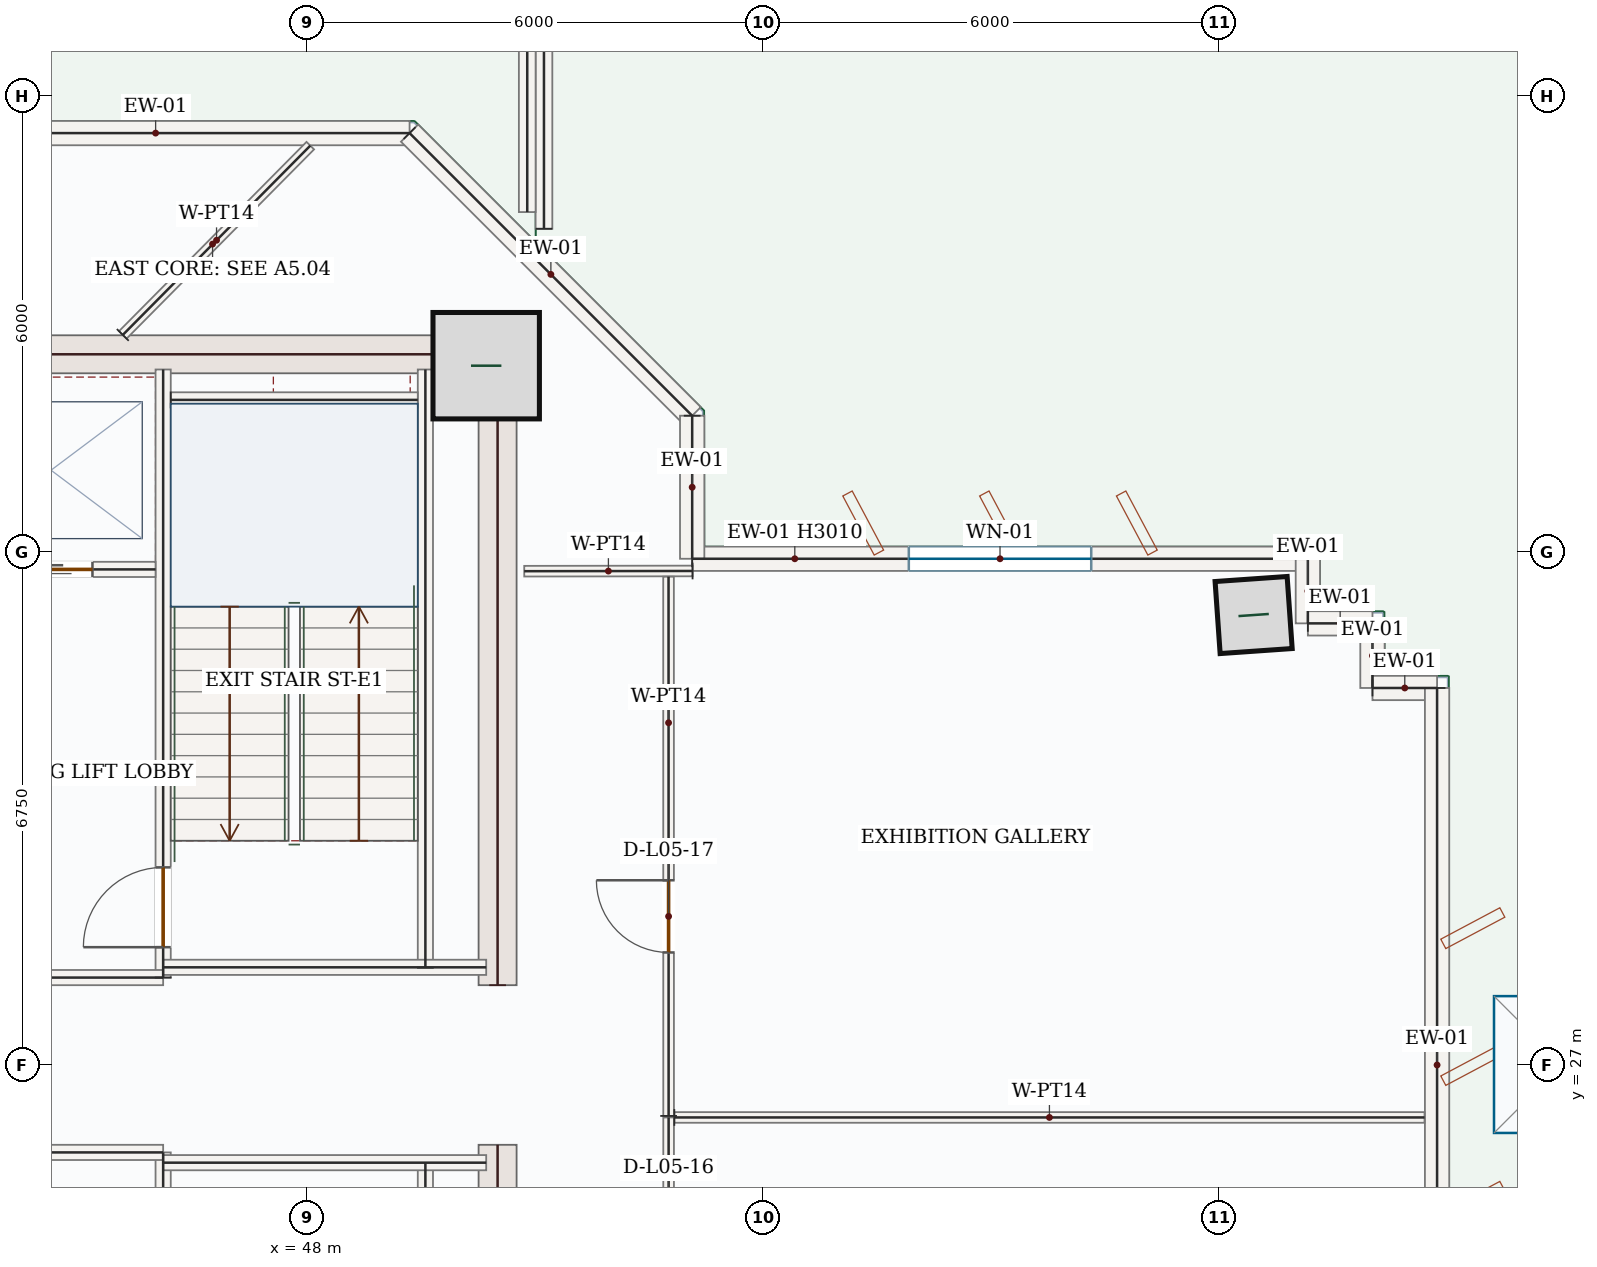
"""IFC4 building model, lengths in metres.
Left out: names, types, materials, properties, quantities, classifications, styles, units other than length and angle.
Written with IfcOpenShell. Run it as: python <this file> out.ifc"""

import sys

from ifc_helpers import new_model, si_unit, direction, frame, frame_2d, origin, origin_2d, place, context, subcontext, project, spatial, rectangle, hollow_rectangle, extrude, source, transform, mapped, element, fill, save


model = new_model("IFC4")
c1 = context("Model", 3, precision=1e-05, world=origin(), true_north=direction((0.0, 1.0)))
c2 = subcontext(c1, "Body", "Model", "MODEL_VIEW")
j1 = project(units=[si_unit("LENGTHUNIT", "METRE"), si_unit("PLANEANGLEUNIT", "RADIAN")], contexts=[c1])
p1 = place(None, origin())
s1 = spatial("IfcSite", under=j1, at=p1, CompositionType="ELEMENT")
p2 = place(p1, origin())
s2 = spatial("IfcBuilding", under=s1, at=p2, CompositionType="ELEMENT")
p3 = place(p2, frame((0.0, 0.0, 29.1)))
s3 = spatial("IfcBuildingStorey", under=s2, at=p3, CompositionType="ELEMENT", Elevation=29.1)
m1 = source(origin(), c2, "Body", "SweptSolid", [
    extrude(rectangle(XDim=8.55, YDim=0.5, at=frame_2d((4.275, 0.0))), origin(), (0.0, 0.0, 1.0), 3.95),
])
for number, where, z_axis, x_axis in (
    (1, (50.5, 17.4, 0.0), (0.0, 0.0, 1.0), (0.0, 1.0, 0.0)),
    (2, (50.5, 28.05, 0.0), (0.0, 0.0, 1.0), (0.0, 1.0, 0.0)),
):
    element("IfcWall", number, at=place(p3, frame(where, z_axis=z_axis, x_axis=x_axis)), inside=s3, PredefinedType="SHEAR", context=c2, shape_type="MappedRepresentation", body=[
        mapped(m1, transform((0.0, 0.0, 0.0), x_axis=(1.0, 0.0, 0.0), y_axis=(0.0, 1.0, 0.0), z_axis=(0.0, 0.0, 1.0), scale=1.0)),
    ])
m2 = source(origin(), c2, "Body", "SweptSolid", [
    extrude(rectangle(XDim=7.0, YDim=0.5, at=frame_2d((3.5, 0.0))), origin(), (0.0, 0.0, 1.0), 3.95),
])
p4 = place(p3, frame((43.25, 36.35, 0.0), z_axis=(0.0, 0.0, 1.0), x_axis=(1.0, 0.0, 0.0)))
e3 = element("IfcWall", 3, at=p4, inside=s3, PredefinedType="SHEAR", context=c2, shape_type="MappedRepresentation", body=[
    mapped(m2, transform((0.0, 0.0, 0.0), x_axis=(1.0, 0.0, 0.0), y_axis=(0.0, 1.0, 0.0), z_axis=(0.0, 0.0, 1.0), scale=1.0)),
])
m3 = source(origin(), c2, "Body", "SweptSolid", [
    extrude(rectangle(XDim=1.4, YDim=1.4, at=origin_2d()), origin(), (0.0, 0.0, 1.0), 4.2),
])
p5 = place(p3, frame((50.35, 36.2, 0.0), z_axis=(0.0, 0.0, 1.0), x_axis=(1.0, 0.0, 0.0)))
e4 = element("IfcColumn", 4, at=p5, inside=s3, PredefinedType="COLUMN", context=c2, shape_type="MappedRepresentation", body=[
    mapped(m3, transform((0.0, 0.0, 0.0), x_axis=(1.0, 0.0, 0.0), y_axis=(0.0, 1.0, 0.0), z_axis=(0.0, 0.0, 1.0), scale=1.0)),
])
m4 = source(origin(), c2, "Body", "SweptSolid", [
    extrude(hollow_rectangle(XDim=0.95, YDim=0.95, WallThickness=0.05, at=origin_2d()), origin(), (0.0, 0.0, 1.0), 4.2),
])
p6 = place(p3, frame((60.447, 32.92, 0.0), z_axis=(0.0, 0.0, 1.0), x_axis=(0.99756405026, 0.069756473744, 0.0)))
e5 = element("IfcColumn", 5, at=p6, inside=s3, PredefinedType="COLUMN", context=c2, shape_type="MappedRepresentation", body=[
    mapped(m4, transform((0.0, 0.0, 0.0), x_axis=(1.0, 0.0, 0.0), y_axis=(0.0, 1.0, 0.0), z_axis=(0.0, 0.0, 1.0), scale=1.0)),
])
m5 = source(origin(), c2, "Body", "SweptSolid", [
    extrude(rectangle(XDim=10.889, YDim=0.22, at=frame_2d((5.444, 0.0))), origin(), (0.0, 0.0, 1.0), 1.2),
])
p7 = place(p3, frame((51.11, 38.001, 0.0), z_axis=(0.0, 0.0, 1.0), x_axis=(0.0, 1.0, 0.0)))
e6 = element("IfcWall", 6, at=p7, inside=s3, PredefinedType="PARAPET", context=c2, shape_type="MappedRepresentation", body=[
    mapped(m5, transform((0.0, 0.0, 0.0), x_axis=(1.0, 0.0, 0.0), y_axis=(0.0, 1.0, 0.0), z_axis=(0.0, 0.0, 1.0), scale=1.0)),
])
m6 = source(origin(), c2, "Body", "SweptSolid", [
    extrude(rectangle(XDim=10.669, YDim=0.22, at=frame_2d((5.334, 0.0))), origin(), (0.0, 0.0, 1.0), 1.2),
])
p8 = place(p3, frame((50.89, 48.89, 0.0), z_axis=(0.0, 0.0, 1.0), x_axis=(0.0, -1.0, 0.0)))
e7 = element("IfcWall", 7, at=p8, inside=s3, PredefinedType="PARAPET", context=c2, shape_type="MappedRepresentation", body=[
    mapped(m6, transform((0.0, 0.0, 0.0), x_axis=(1.0, 0.0, 0.0), y_axis=(0.0, 1.0, 0.0), z_axis=(0.0, 0.0, 1.0), scale=1.0)),
])
p9 = place(p3, frame((53.06, 33.66, 0.0), z_axis=(0.0, 0.0, 1.0), x_axis=(1.0, 0.0, 0.0)))
e8 = element("IfcWall", 8, at=p9, inside=s3, PredefinedType="SOLIDWALL", context=c2, shape_type="SweptSolid", body=[
    extrude(rectangle(XDim=8.1, YDim=0.32, at=frame_2d((4.05, 0.0))), origin(), (0.0, 0.0, 1.0), 3.01),
])
p10 = place(p9, frame((2.85, 0.0, 0.85)))
e9 = element("IfcOpeningElement", 9, at=p10, cuts=e8, PredefinedType="OPENING", context=c2, shape_type="SweptSolid", body=[
    extrude(rectangle(XDim=2.4, YDim=1.8, at=frame_2d((1.2, 0.9))), frame((0.0, 0.17, 0.0), z_axis=(0.0, -1.0, 0.0), x_axis=(1.0, 0.0, 0.0)), (0.0, 0.0, 1.0), 0.34),
])
m7 = source(origin(), c2, "Body", "SweptSolid", [
    extrude(rectangle(XDim=0.85, YDim=0.32, at=frame_2d((0.425, 0.0))), origin(), (0.0, 0.0, 1.0), 3.95),
])
p11 = place(p3, frame((61.16, 33.66, 0.0), z_axis=(0.0, 0.0, 1.0), x_axis=(0.0, -1.0, 0.0)))
e10 = element("IfcWall", 10, at=p11, inside=s3, PredefinedType="SOLIDWALL", context=c2, shape_type="MappedRepresentation", body=[
    mapped(m7, transform((0.0, 0.0, 0.0), x_axis=(1.0, 0.0, 0.0), y_axis=(0.0, 1.0, 0.0), z_axis=(0.0, 0.0, 1.0), scale=1.0)),
])
m8 = source(origin(), c2, "Body", "SweptSolid", [
    extrude(rectangle(XDim=0.85, YDim=0.32, at=frame_2d((0.425, 0.0))), origin(), (0.0, 0.0, 1.0), 3.95),
])
for number, where, z_axis, x_axis in (
    (11, (61.16, 32.81, 0.0), (0.0, 0.0, 1.0), (1.0, 0.0, 0.0)),
    (12, (62.01, 32.81, 0.0), (0.0, 0.0, 1.0), (0.0, -1.0, 0.0)),
    (13, (62.01, 31.96, 0.0), (0.0, 0.0, 1.0), (1.0, 0.0, 0.0)),
):
    element("IfcWall", number, at=place(p3, frame(where, z_axis=z_axis, x_axis=x_axis)), inside=s3, PredefinedType="SOLIDWALL", context=c2, shape_type="MappedRepresentation", body=[
        mapped(m8, transform((0.0, 0.0, 0.0), x_axis=(1.0, 0.0, 0.0), y_axis=(0.0, 1.0, 0.0), z_axis=(0.0, 0.0, 1.0), scale=1.0)),
    ])
m9 = source(origin(), c2, "Body", "SweptSolid", [
    extrude(rectangle(XDim=9.92, YDim=0.32, at=frame_2d((4.96, 0.0))), origin(), (0.0, 0.0, 1.0), 3.95),
])
p12 = place(p3, frame((62.86, 31.96, 0.0), z_axis=(0.0, 0.0, 1.0), x_axis=(0.0, -1.0, 0.0)))
e14 = element("IfcWall", 14, at=p12, inside=s3, PredefinedType="SOLIDWALL", context=c2, shape_type="MappedRepresentation", body=[
    mapped(m9, transform((0.0, 0.0, 0.0), x_axis=(1.0, 0.0, 0.0), y_axis=(0.0, 1.0, 0.0), z_axis=(0.0, 0.0, 1.0), scale=1.0)),
])
m10 = source(origin(), c2, "Body", "SweptSolid", [
    extrude(rectangle(XDim=6.682, YDim=0.32, at=frame_2d((3.341, 0.0))), origin(), (0.0, 0.0, 1.0), 3.95),
])
p13 = place(p3, frame((42.66, 39.26, 0.0), z_axis=(0.0, 0.0, 1.0), x_axis=(1.0, 0.0, 0.0)))
e15 = element("IfcWall", 15, at=p13, inside=s3, PredefinedType="SOLIDWALL", context=c2, shape_type="MappedRepresentation", body=[
    mapped(m10, transform((0.0, 0.0, 0.0), x_axis=(1.0, 0.0, 0.0), y_axis=(0.0, 1.0, 0.0), z_axis=(0.0, 0.0, 1.0), scale=1.0)),
])
m11 = source(origin(), c2, "Body", "SweptSolid", [
    extrude(rectangle(XDim=5.258, YDim=0.32, at=frame_2d((2.629, 0.0))), origin(), (0.0, 0.0, 1.0), 3.95),
])
p14 = place(p3, frame((49.342, 39.26, 0.0), z_axis=(0.0, 0.0, 1.0), x_axis=(0.707106781187, -0.707106781187, 0.0)))
e16 = element("IfcWall", 16, at=p14, inside=s3, PredefinedType="SOLIDWALL", context=c2, shape_type="MappedRepresentation", body=[
    mapped(m11, transform((0.0, 0.0, 0.0), x_axis=(1.0, 0.0, 0.0), y_axis=(0.0, 1.0, 0.0), z_axis=(0.0, 0.0, 1.0), scale=1.0)),
])
m12 = source(origin(), c2, "Body", "SweptSolid", [
    extrude(rectangle(XDim=1.882, YDim=0.32, at=frame_2d((0.941, 0.0))), origin(), (0.0, 0.0, 1.0), 3.95),
])
p15 = place(p3, frame((53.06, 35.542, 0.0), z_axis=(0.0, 0.0, 1.0), x_axis=(0.0, -1.0, 0.0)))
e17 = element("IfcWall", 17, at=p15, inside=s3, PredefinedType="SOLIDWALL", context=c2, shape_type="MappedRepresentation", body=[
    mapped(m12, transform((0.0, 0.0, 0.0), x_axis=(1.0, 0.0, 0.0), y_axis=(0.0, 1.0, 0.0), z_axis=(0.0, 0.0, 1.0), scale=1.0)),
])
m13 = source(origin(), c2, "Body", "SweptSolid", [
    extrude(rectangle(XDim=7.87, YDim=0.2, at=frame_2d((3.935, 0.0))), origin(), (0.0, 0.0, 1.0), 3.95),
])
for number, where, z_axis, x_axis in (
    (18, (49.55, 17.85, 0.0), (0.0, 0.0, 1.0), (0.0, 1.0, 0.0)),
    (19, (49.55, 28.28, 0.0), (0.0, 0.0, 1.0), (0.0, 1.0, 0.0)),
):
    element("IfcWall", number, at=place(p3, frame(where, z_axis=z_axis, x_axis=x_axis)), inside=s3, PredefinedType="SOLIDWALL", context=c2, shape_type="MappedRepresentation", body=[
        mapped(m13, transform((0.0, 0.0, 0.0), x_axis=(1.0, 0.0, 0.0), y_axis=(0.0, 1.0, 0.0), z_axis=(0.0, 0.0, 1.0), scale=1.0)),
    ])
p16 = place(p3, frame((46.1, 17.85, 0.0), z_axis=(0.0, 0.0, 1.0), x_axis=(0.0, 1.0, 0.0)))
e20 = element("IfcWall", 20, at=p16, inside=s3, PredefinedType="SOLIDWALL", context=c2, shape_type="SweptSolid", body=[
    extrude(rectangle(XDim=8.0, YDim=0.2, at=frame_2d((4.0, 0.0))), origin(), (0.0, 0.0, 1.0), 3.95),
])
p17 = place(p16, frame((6.3, 0.0, 0.0)))
e21 = element("IfcOpeningElement", 21, at=p17, cuts=e20, PredefinedType="OPENING", context=c2, shape_type="SweptSolid", body=[
    extrude(rectangle(XDim=1.05, YDim=2.15, at=frame_2d((0.525, 1.075))), frame((0.0, 0.11, 0.0), z_axis=(0.0, -1.0, 0.0), x_axis=(1.0, 0.0, 0.0)), (0.0, 0.0, 1.0), 0.22),
])
p18 = place(p3, frame((46.1, 28.15, 0.0), z_axis=(0.0, 0.0, 1.0), x_axis=(0.0, 1.0, 0.0)))
e22 = element("IfcWall", 22, at=p18, inside=s3, PredefinedType="SOLIDWALL", context=c2, shape_type="SweptSolid", body=[
    extrude(rectangle(XDim=8.0, YDim=0.2, at=frame_2d((4.0, 0.0))), origin(), (0.0, 0.0, 1.0), 3.95),
])
p19 = place(p18, frame((0.4, 0.0, 0.0)))
e23 = element("IfcOpeningElement", 23, at=p19, cuts=e22, PredefinedType="OPENING", context=c2, shape_type="SweptSolid", body=[
    extrude(rectangle(XDim=1.05, YDim=2.15, at=frame_2d((0.525, 1.075))), frame((0.0, 0.11, 0.0), z_axis=(0.0, -1.0, 0.0), x_axis=(1.0, 0.0, 0.0)), (0.0, 0.0, 1.0), 0.22),
])
m14 = source(origin(), c2, "Body", "SweptSolid", [
    extrude(rectangle(XDim=3.0, YDim=0.2, at=frame_2d((1.5, 0.0))), origin(), (0.0, 0.0, 1.0), 3.95),
])
p20 = place(p3, frame((43.1, 25.85, 0.0), z_axis=(0.0, 0.0, 1.0), x_axis=(1.0, 0.0, 0.0)))
e24 = element("IfcWall", 24, at=p20, inside=s3, PredefinedType="SOLIDWALL", context=c2, shape_type="MappedRepresentation", body=[
    mapped(m14, transform((0.0, 0.0, 0.0), x_axis=(1.0, 0.0, 0.0), y_axis=(0.0, 1.0, 0.0), z_axis=(0.0, 0.0, 1.0), scale=1.0)),
])
m15 = source(origin(), c2, "Body", "SweptSolid", [
    extrude(rectangle(XDim=4.25, YDim=0.2, at=frame_2d((2.125, 0.0))), origin(), (0.0, 0.0, 1.0), 3.95),
])
p21 = place(p3, frame((46.1, 25.715, 0.0), z_axis=(0.0, 0.0, 1.0), x_axis=(1.0, 0.0, 0.0)))
e25 = element("IfcWall", 25, at=p21, inside=s3, PredefinedType="SOLIDWALL", context=c2, shape_type="MappedRepresentation", body=[
    mapped(m15, transform((0.0, 0.0, 0.0), x_axis=(1.0, 0.0, 0.0), y_axis=(0.0, 1.0, 0.0), z_axis=(0.0, 0.0, 1.0), scale=1.0)),
])
p22 = place(p3, frame((43.1, 28.15, 0.0), z_axis=(0.0, 0.0, 1.0), x_axis=(1.0, 0.0, 0.0)))
e26 = element("IfcWall", 26, at=p22, inside=s3, PredefinedType="SOLIDWALL", context=c2, shape_type="MappedRepresentation", body=[
    mapped(m14, transform((0.0, 0.0, 0.0), x_axis=(1.0, 0.0, 0.0), y_axis=(0.0, 1.0, 0.0), z_axis=(0.0, 0.0, 1.0), scale=1.0)),
])
p23 = place(p3, frame((46.1, 28.285, 0.0), z_axis=(0.0, 0.0, 1.0), x_axis=(1.0, 0.0, 0.0)))
e27 = element("IfcWall", 27, at=p23, inside=s3, PredefinedType="SOLIDWALL", context=c2, shape_type="MappedRepresentation", body=[
    mapped(m15, transform((0.0, 0.0, 0.0), x_axis=(1.0, 0.0, 0.0), y_axis=(0.0, 1.0, 0.0), z_axis=(0.0, 0.0, 1.0), scale=1.0)),
])
m16 = source(origin(), c2, "Body", "SweptSolid", [
    extrude(rectangle(XDim=3.25, YDim=0.2, at=frame_2d((1.625, 0.0))), origin(), (0.0, 0.0, 1.0), 3.95),
])
p24 = place(p3, frame((46.2, 35.75, 0.0), z_axis=(0.0, 0.0, 1.0), x_axis=(1.0, 0.0, 0.0)))
e28 = element("IfcWall", 28, at=p24, inside=s3, PredefinedType="SOLIDWALL", context=c2, shape_type="MappedRepresentation", body=[
    mapped(m16, transform((0.0, 0.0, 0.0), x_axis=(1.0, 0.0, 0.0), y_axis=(0.0, 1.0, 0.0), z_axis=(0.0, 0.0, 1.0), scale=1.0)),
])
p25 = place(p3, frame((43.25, 33.52, 0.0), z_axis=(0.0, 0.0, 1.0), x_axis=(1.0, 0.0, 0.0)))
e29 = element("IfcWall", 29, at=p25, inside=s3, PredefinedType="SOLIDWALL", context=c2, shape_type="SweptSolid", body=[
    extrude(rectangle(XDim=2.75, YDim=0.2, at=frame_2d((1.375, 0.0))), origin(), (0.0, 0.0, 1.0), 3.95),
])
p26 = place(p25, frame((0.82, 0.0, 0.0)))
e30 = element("IfcOpeningElement", 30, at=p26, cuts=e29, PredefinedType="OPENING", context=c2, shape_type="SweptSolid", body=[
    extrude(rectangle(XDim=1.1, YDim=2.15, at=frame_2d((0.55, 1.075))), frame((0.0, 0.11, 0.0), z_axis=(0.0, -1.0, 0.0), x_axis=(1.0, 0.0, 0.0)), (0.0, 0.0, 1.0), 0.22),
])
p27 = place(p3, frame((52.75, 20.575, 0.0), z_axis=(0.0, 0.0, 1.0), x_axis=(0.0, 1.0, 0.0)))
e31 = element("IfcWall", 31, at=p27, inside=s3, PredefinedType="PARTITIONING", context=c2, shape_type="SweptSolid", body=[
    extrude(rectangle(XDim=5.735, YDim=0.14, at=frame_2d((2.868, 0.0))), origin(), (0.0, 0.0, 1.0), 3.95),
])
p28 = place(p27, frame((3.732, 0.0, 0.0)))
e32 = element("IfcOpeningElement", 32, at=p28, cuts=e31, PredefinedType="OPENING", context=c2, shape_type="SweptSolid", body=[
    extrude(rectangle(XDim=0.95, YDim=2.15, at=frame_2d((0.475, 1.075))), frame((0.0, 0.08, 0.0), z_axis=(0.0, -1.0, 0.0), x_axis=(1.0, 0.0, 0.0)), (0.0, 0.0, 1.0), 0.16),
])
m17 = source(origin(), c2, "Body", "SweptSolid", [
    extrude(rectangle(XDim=9.87, YDim=0.14, at=frame_2d((4.935, 0.0))), origin(), (0.0, 0.0, 1.0), 3.95),
])
p29 = place(p3, frame((52.825, 26.31, 0.0), z_axis=(0.0, 0.0, 1.0), x_axis=(1.0, 0.0, 0.0)))
e33 = element("IfcWall", 33, at=p29, inside=s3, PredefinedType="PARTITIONING", context=c2, shape_type="MappedRepresentation", body=[
    mapped(m17, transform((0.0, 0.0, 0.0), x_axis=(1.0, 0.0, 0.0), y_axis=(0.0, 1.0, 0.0), z_axis=(0.0, 0.0, 1.0), scale=1.0)),
])
m18 = source(origin(), c2, "Body", "SweptSolid", [
    extrude(rectangle(XDim=2.214, YDim=0.14, at=frame_2d((1.107, 0.0))), origin(), (0.0, 0.0, 1.0), 3.95),
])
p30 = place(p3, frame((53.065, 33.5, 0.0), z_axis=(0.0, 0.0, 1.0), x_axis=(-0.99999912478, -0.001323041841, 0.0)))
e34 = element("IfcWall", 34, at=p30, inside=s3, PredefinedType="PARTITIONING", context=c2, shape_type="MappedRepresentation", body=[
    mapped(m18, transform((0.0, 0.0, 0.0), x_axis=(1.0, 0.0, 0.0), y_axis=(0.0, 1.0, 0.0), z_axis=(0.0, 0.0, 1.0), scale=1.0)),
])
m19 = source(origin(), c2, "Body", "SweptSolid", [
    extrude(rectangle(XDim=3.505, YDim=0.14, at=frame_2d((1.752, 0.0))), origin(), (0.0, 0.0, 1.0), 3.95),
])
p31 = place(p3, frame((45.569, 36.605, 0.0), z_axis=(0.0, 0.0, 1.0), x_axis=(0.703790445361, 0.710407635811, 0.0)))
e35 = element("IfcWall", 35, at=p31, inside=s3, PredefinedType="PARTITIONING", context=c2, shape_type="MappedRepresentation", body=[
    mapped(m19, transform((0.0, 0.0, 0.0), x_axis=(1.0, 0.0, 0.0), y_axis=(0.0, 1.0, 0.0), z_axis=(0.0, 0.0, 1.0), scale=1.0)),
])
p32 = place(p3, frame((52.75, 26.33, 0.0), z_axis=(0.0, 0.0, 1.0), x_axis=(-0.000137660459, 0.999999990525, 0.0)))
e36 = element("IfcWall", 36, at=p32, inside=s3, PredefinedType="PARTITIONING", context=c2, shape_type="SweptSolid", body=[
    extrude(rectangle(XDim=7.094, YDim=0.14, at=frame_2d((3.547, 0.0))), origin(), (0.0, 0.0, 1.0), 3.95),
])
p33 = place(p32, frame((2.15, 0.0, 0.0)))
e37 = element("IfcOpeningElement", 37, at=p33, cuts=e36, PredefinedType="OPENING", context=c2, shape_type="SweptSolid", body=[
    extrude(rectangle(XDim=0.95, YDim=2.15, at=frame_2d((0.475, 1.075))), frame((0.0, 0.08, 0.0), z_axis=(0.0, -1.0, 0.0), x_axis=(1.0, 0.0, 0.0)), (0.0, 0.0, 1.0), 0.16),
])
p34 = place(p3, frame((0.0, 0.0, -0.22)))
p35 = place(p34, frame((64.509, 27.006, 0.0)))
p36 = place(p35, frame((0.0, 0.0, 0.22)))
e38 = element("IfcWindow", 38, at=p36, inside=s3, PartitioningType="SINGLE_PANEL", PredefinedType="SKYLIGHT", context=c2, shape_type="SweptSolid", body=[
    extrude(rectangle(XDim=1.8, YDim=1.8, at=origin_2d()), origin(), (0.0, 0.0, 1.0), 0.05),
])
m20 = source(origin(), c2, "Body", "SweptSolid", [
    extrude(rectangle(XDim=2.4, YDim=1.8, at=frame_2d((1.2, 0.9))), frame((0.0, 0.03, 0.0), z_axis=(0.0, -1.0, 0.0), x_axis=(1.0, 0.0, 0.0)), (0.0, 0.0, 1.0), 0.06),
])
p37 = place(p10, origin())
e39 = element("IfcWindow", 39, at=p37, inside=s3, PartitioningType="DOUBLE_PANEL_VERTICAL", PredefinedType="WINDOW", context=c2, shape_type="MappedRepresentation", body=[
    mapped(m20, transform((0.0, 0.0, 0.0), x_axis=(1.0, 0.0, 0.0), y_axis=(0.0, 1.0, 0.0), z_axis=(0.0, 0.0, 1.0), scale=1.0)),
])
fill(e9, e39)
m21 = source(origin(), c2, "Body", "SweptSolid", [
    extrude(rectangle(XDim=1.05, YDim=2.15, at=frame_2d((0.525, 1.075))), frame((0.0, 0.025, 0.0), z_axis=(0.0, -1.0, 0.0), x_axis=(1.0, 0.0, 0.0)), (0.0, 0.0, 1.0), 0.05),
])
p38 = place(p19, origin())
e40 = element("IfcDoor", 40, at=p38, inside=s3, OperationType="SINGLE_SWING_LEFT", PredefinedType="DOOR", context=c2, shape_type="MappedRepresentation", body=[
    mapped(m21, transform((0.0, 0.0, 0.0), x_axis=(1.0, 0.0, 0.0), y_axis=(0.0, 1.0, 0.0), z_axis=(0.0, 0.0, 1.0), scale=1.0)),
])
fill(e23, e40)
m22 = source(origin(), c2, "Body", "SweptSolid", [
    extrude(rectangle(XDim=1.1, YDim=2.15, at=frame_2d((0.55, 1.075))), frame((0.0, 0.025, 0.0), z_axis=(0.0, -1.0, 0.0), x_axis=(1.0, 0.0, 0.0)), (0.0, 0.0, 1.0), 0.05),
])
p39 = place(p26, origin())
e41 = element("IfcDoor", 41, at=p39, inside=s3, OperationType="DOUBLE_DOOR_SLIDING", PredefinedType="DOOR", context=c2, shape_type="MappedRepresentation", body=[
    mapped(m22, transform((0.0, 0.0, 0.0), x_axis=(1.0, 0.0, 0.0), y_axis=(0.0, 1.0, 0.0), z_axis=(0.0, 0.0, 1.0), scale=1.0)),
])
fill(e30, e41)
m23 = source(origin(), c2, "Body", "SweptSolid", [
    extrude(rectangle(XDim=0.95, YDim=2.15, at=frame_2d((0.475, 1.075))), frame((0.0, 0.025, 0.0), z_axis=(0.0, -1.0, 0.0), x_axis=(1.0, 0.0, 0.0)), (0.0, 0.0, 1.0), 0.05),
])
p40 = place(p33, origin())
e42 = element("IfcDoor", 42, at=p40, inside=s3, OperationType="SINGLE_SWING_RIGHT", PredefinedType="DOOR", context=c2, shape_type="MappedRepresentation", body=[
    mapped(m23, transform((0.0, 0.0, 0.0), x_axis=(1.0, 0.0, 0.0), y_axis=(0.0, 1.0, 0.0), z_axis=(0.0, 0.0, 1.0), scale=1.0)),
])
fill(e37, e42)
save(model, sys.argv[1])
